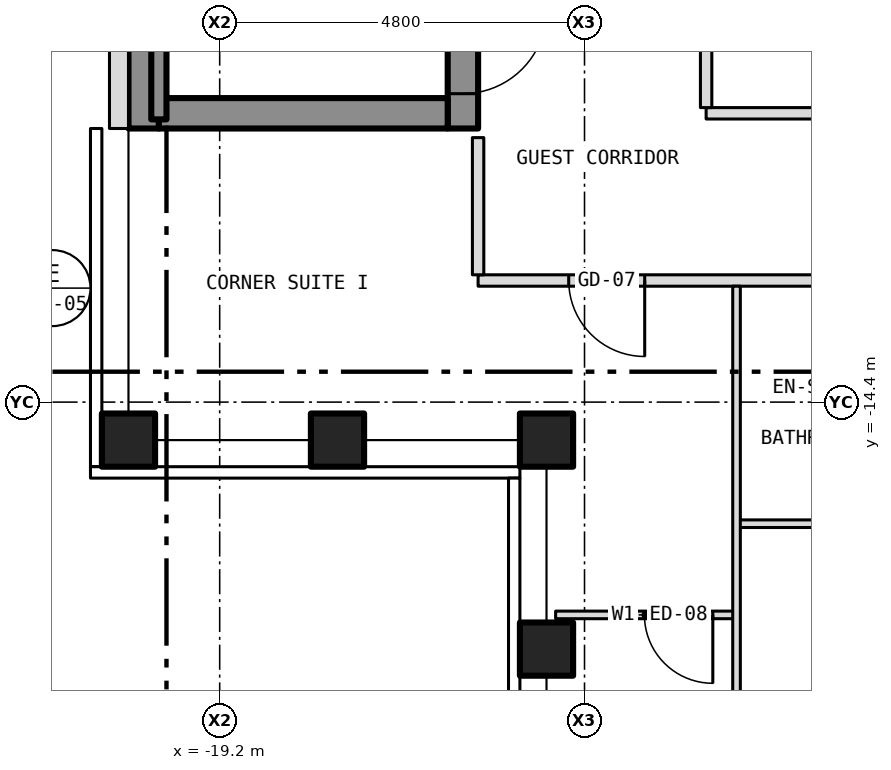
"""IFC4 building model, lengths in metres.
Left out: names, types, materials, properties, quantities, classifications, styles, units other than length and angle.
Written with IfcOpenShell. Run it as: python <this file> out.ifc"""

import sys

from ifc_helpers import new_model, si_unit, direction, frame, frame_2d, origin, origin_2d, place, context, subcontext, project, spatial, rectangle, hollow_rectangle, extrude, element, fill, save


model = new_model("IFC4")
c1 = context("Model", 3, precision=1e-05, world=origin(), true_north=direction((0.0, 1.0)))
c2 = subcontext(c1, "Body", "Model", "MODEL_VIEW")
j1 = project(units=[si_unit("LENGTHUNIT", "METRE"), si_unit("PLANEANGLEUNIT", "RADIAN")], contexts=[c1])
p1 = place(None, origin())
s1 = spatial("IfcSite", under=j1, at=p1, CompositionType="ELEMENT")
p2 = place(p1, origin())
s2 = spatial("IfcBuilding", under=s1, at=p2, CompositionType="ELEMENT")
p3 = place(p2, frame((0.0, 0.0, 212.0)))
s3 = spatial("IfcBuildingStorey", under=s2, at=p3, CompositionType="ELEMENT", Elevation=212.0)
for number, where, z_axis, x_axis in (
    (1, (-20.4, -14.9, -0.15), (0.0, 0.0, 1.0), (1.0, 0.0, 0.0)),
    (2, (-14.9, -14.9, -0.15), (0.0, 0.0, 1.0), (1.0, 0.0, 0.0)),
    (3, (-14.9, -17.65, -0.15), (0.0, 0.0, 1.0), (1.0, 0.0, 0.0)),
    (4, (-17.65, -14.9, -0.15), (0.0, 0.0, 1.0), (1.0, 0.0, 0.0)),
):
    element("IfcColumn", number, at=place(p3, frame(where, z_axis=z_axis, x_axis=x_axis)), inside=s3, PredefinedType="COLUMN", context=c2, shape_type="SweptSolid", body=[
        extrude(hollow_rectangle(XDim=0.7, YDim=0.7, WallThickness=0.04, at=origin_2d()), origin(), (0.0, 0.0, 1.0), 3.5),
    ])
p4 = place(p3, frame((-16.0, -10.8, 0.0), z_axis=(0.0, 0.0, 1.0), x_axis=(0.0, 1.0, 0.0)))
e5 = element("IfcWall", 5, at=p4, inside=s3, PredefinedType="SHEAR", context=c2, shape_type="SweptSolid", body=[
    extrude(rectangle(XDim=21.6, YDim=0.4, at=frame_2d((10.8, 0.0))), origin(), (0.0, 0.0, 1.0), 3.25),
])
p5 = place(p4, frame((9.4, 0.0, 0.0)))
e6 = element("IfcOpeningElement", 6, at=p5, cuts=e5, PredefinedType="OPENING", context=c2, shape_type="SweptSolid", body=[
    extrude(rectangle(XDim=1.1, YDim=2.1, at=frame_2d((0.55, 1.05))), frame((0.0, 0.212, 0.0), z_axis=(0.0, -1.0, 0.0), x_axis=(1.0, 0.0, 0.0)), (0.0, 0.0, 1.0), 0.424),
])
p6 = place(p4, frame((11.5, 0.0, 0.0)))
e7 = element("IfcOpeningElement", 7, at=p6, cuts=e5, PredefinedType="OPENING", context=c2, shape_type="SweptSolid", body=[
    extrude(rectangle(XDim=1.1, YDim=2.1, at=frame_2d((0.55, 1.05))), frame((0.0, 0.212, 0.0), z_axis=(0.0, -1.0, 0.0), x_axis=(1.0, 0.0, 0.0)), (0.0, 0.0, 1.0), 0.424),
])
p7 = place(p4, frame((13.6, 0.0, 0.0)))
e8 = element("IfcOpeningElement", 8, at=p7, cuts=e5, PredefinedType="OPENING", context=c2, shape_type="SweptSolid", body=[
    extrude(rectangle(XDim=1.1, YDim=2.1, at=frame_2d((0.55, 1.05))), frame((0.0, 0.212, 0.0), z_axis=(0.0, -1.0, 0.0), x_axis=(1.0, 0.0, 0.0)), (0.0, 0.0, 1.0), 0.424),
])
p8 = place(p4, frame((15.7, 0.0, 0.0)))
e9 = element("IfcOpeningElement", 9, at=p8, cuts=e5, PredefinedType="OPENING", context=c2, shape_type="SweptSolid", body=[
    extrude(rectangle(XDim=1.1, YDim=2.1, at=frame_2d((0.55, 1.05))), frame((0.0, 0.212, 0.0), z_axis=(0.0, -1.0, 0.0), x_axis=(1.0, 0.0, 0.0)), (0.0, 0.0, 1.0), 0.424),
])
p9 = place(p4, frame((17.8, 0.0, 0.0)))
e10 = element("IfcOpeningElement", 10, at=p9, cuts=e5, PredefinedType="OPENING", context=c2, shape_type="SweptSolid", body=[
    extrude(rectangle(XDim=1.1, YDim=2.1, at=frame_2d((0.55, 1.05))), frame((0.0, 0.212, 0.0), z_axis=(0.0, -1.0, 0.0), x_axis=(1.0, 0.0, 0.0)), (0.0, 0.0, 1.0), 0.424),
])
p10 = place(p4, frame((0.458, 0.0, 0.0)))
e11 = element("IfcOpeningElement", 11, at=p10, cuts=e5, PredefinedType="OPENING", context=c2, shape_type="SweptSolid", body=[
    extrude(rectangle(XDim=1.1, YDim=2.1, at=frame_2d((0.55, 1.05))), frame((0.0, 0.212, 0.0), z_axis=(0.0, -1.0, 0.0), x_axis=(1.0, 0.0, 0.0)), (0.0, 0.0, 1.0), 0.424),
])
p11 = place(p4, frame((7.5, 0.0, 0.0)))
e12 = element("IfcOpeningElement", 12, at=p11, cuts=e5, PredefinedType="OPENING", context=c2, shape_type="SweptSolid", body=[
    extrude(rectangle(XDim=1.1, YDim=2.1, at=frame_2d((0.55, 1.05))), frame((0.0, 0.212, 0.0), z_axis=(0.0, -1.0, 0.0), x_axis=(1.0, 0.0, 0.0)), (0.0, 0.0, 1.0), 0.424),
])
p12 = place(p4, frame((20.0, 0.0, 0.0)))
e13 = element("IfcOpeningElement", 13, at=p12, cuts=e5, PredefinedType="OPENING", context=c2, shape_type="SweptSolid", body=[
    extrude(rectangle(XDim=0.9, YDim=2.1, at=frame_2d((0.45, 1.05))), frame((0.0, 0.212, 0.0), z_axis=(0.0, -1.0, 0.0), x_axis=(1.0, 0.0, 0.0)), (0.0, 0.0, 1.0), 0.424),
])
p13 = place(p3, frame((-20.2, -10.8, 0.0), z_axis=(0.0, 0.0, 1.0), x_axis=(0.0, 1.0, 0.0)))
e14 = element("IfcWall", 14, at=p13, inside=s3, PredefinedType="SHEAR", context=c2, shape_type="SweptSolid", body=[
    extrude(rectangle(XDim=21.6, YDim=0.4, at=frame_2d((10.8, 0.0))), origin(), (0.0, 0.0, 1.0), 3.25),
])
p14 = place(p3, frame((-20.0, -10.6, 0.0), z_axis=(0.0, 0.0, 1.0), x_axis=(1.0, 0.0, 0.0)))
e15 = element("IfcWall", 15, at=p14, inside=s3, PredefinedType="SHEAR", context=c2, shape_type="SweptSolid", body=[
    extrude(rectangle(XDim=3.8, YDim=0.4, at=frame_2d((1.9, 0.0))), origin(), (0.0, 0.0, 1.0), 3.25),
])
p15 = place(p3, frame((-20.525, 10.8, 0.0), z_axis=(0.0, 0.0, 1.0), x_axis=(0.0, -1.0, 0.0)))
e16 = element("IfcWall", 16, at=p15, inside=s3, PredefinedType="SOLIDWALL", context=c2, shape_type="SweptSolid", body=[
    extrude(rectangle(XDim=21.6, YDim=0.25, at=frame_2d((10.8, 0.0))), origin(), (0.0, 0.0, 1.0), 3.5),
])
p16 = place(p15, frame((18.05, 0.0, 1.0)))
e17 = element("IfcOpeningElement", 17, at=p16, cuts=e16, PredefinedType="OPENING", context=c2, shape_type="SweptSolid", body=[
    extrude(rectangle(XDim=0.6, YDim=1.5, at=frame_2d((0.3, 0.75))), frame((0.0, 0.137, 0.0), z_axis=(0.0, -1.0, 0.0), x_axis=(1.0, 0.0, 0.0)), (0.0, 0.0, 1.0), 0.274),
])
p17 = place(p3, frame((-14.78, -17.2, 0.0), z_axis=(0.0, 0.0, 1.0), x_axis=(1.0, 0.0, 0.0)))
e18 = element("IfcWall", 18, at=p17, inside=s3, PredefinedType="PARTITIONING", context=c2, shape_type="SweptSolid", body=[
    extrude(rectangle(XDim=2.38, YDim=0.1, at=frame_2d((1.19, 0.0))), origin(), (0.0, 0.0, 1.0), 3.35),
])
p18 = place(p17, frame((1.168, 0.0, 0.0)))
e19 = element("IfcOpeningElement", 19, at=p18, cuts=e18, PredefinedType="OPENING", context=c2, shape_type="SweptSolid", body=[
    extrude(rectangle(XDim=0.9, YDim=2.1, at=frame_2d((0.45, 1.05))), frame((0.0, 0.062, 0.0), z_axis=(0.0, -1.0, 0.0), x_axis=(1.0, 0.0, 0.0)), (0.0, 0.0, 1.0), 0.124),
])
p19 = place(p3, frame((-12.4, -16.0, 0.0), z_axis=(0.0, 0.0, 1.0), x_axis=(1.0, 0.0, 0.0)))
e20 = element("IfcWall", 20, at=p19, inside=s3, PredefinedType="PARTITIONING", context=c2, shape_type="SweptSolid", body=[
    extrude(rectangle(XDim=2.2, YDim=0.1, at=frame_2d((1.1, 0.0))), origin(), (0.0, 0.0, 1.0), 3.35),
])
p20 = place(p3, frame((-15.8, -12.8, 0.0), z_axis=(0.0, 0.0, 1.0), x_axis=(1.0, 0.0, 0.0)))
e21 = element("IfcWall", 21, at=p20, inside=s3, PredefinedType="PARTITIONING", context=c2, shape_type="SweptSolid", body=[
    extrude(rectangle(XDim=31.6, YDim=0.15, at=frame_2d((15.8, 0.0))), origin(), (0.0, 0.0, 1.0), 3.35),
])
p21 = place(p20, frame((6.466, 0.0, 0.0)))
e22 = element("IfcOpeningElement", 22, at=p21, cuts=e21, PredefinedType="OPENING", context=c2, shape_type="SweptSolid", body=[
    extrude(rectangle(XDim=1.0, YDim=2.1, at=frame_2d((0.5, 1.05))), frame((0.0, 0.087, 0.0), z_axis=(0.0, -1.0, 0.0), x_axis=(1.0, 0.0, 0.0)), (0.0, 0.0, 1.0), 0.174),
])
p22 = place(p20, frame((15.548, 0.0, 0.0)))
e23 = element("IfcOpeningElement", 23, at=p22, cuts=e21, PredefinedType="OPENING", context=c2, shape_type="SweptSolid", body=[
    extrude(rectangle(XDim=1.0, YDim=2.1, at=frame_2d((0.5, 1.05))), frame((0.0, 0.087, 0.0), z_axis=(0.0, -1.0, 0.0), x_axis=(1.0, 0.0, 0.0)), (0.0, 0.0, 1.0), 0.174),
])
p23 = place(p20, frame((20.018, 0.0, 0.0)))
e24 = element("IfcOpeningElement", 24, at=p23, cuts=e21, PredefinedType="OPENING", context=c2, shape_type="SweptSolid", body=[
    extrude(rectangle(XDim=1.0, YDim=2.1, at=frame_2d((0.5, 1.05))), frame((0.0, 0.087, 0.0), z_axis=(0.0, -1.0, 0.0), x_axis=(1.0, 0.0, 0.0)), (0.0, 0.0, 1.0), 0.174),
])
p24 = place(p20, frame((1.192, 0.0, 0.0)))
e25 = element("IfcOpeningElement", 25, at=p24, cuts=e21, PredefinedType="OPENING", context=c2, shape_type="SweptSolid", body=[
    extrude(rectangle(XDim=1.0, YDim=2.1, at=frame_2d((0.5, 1.05))), frame((0.0, 0.087, 0.0), z_axis=(0.0, -1.0, 0.0), x_axis=(1.0, 0.0, 0.0)), (0.0, 0.0, 1.0), 0.174),
])
p25 = place(p20, frame((29.409, 0.0, 0.0)))
e26 = element("IfcOpeningElement", 26, at=p25, cuts=e21, PredefinedType="OPENING", context=c2, shape_type="SweptSolid", body=[
    extrude(rectangle(XDim=1.0, YDim=2.1, at=frame_2d((0.5, 1.05))), frame((0.0, 0.087, 0.0), z_axis=(0.0, -1.0, 0.0), x_axis=(1.0, 0.0, 0.0)), (0.0, 0.0, 1.0), 0.174),
])
p26 = place(p3, frame((-12.8, -10.6, 0.0), z_axis=(0.0, 0.0, 1.0), x_axis=(1.0, 0.0, 0.0)))
e27 = element("IfcWall", 27, at=p26, inside=s3, PredefinedType="PARTITIONING", context=c2, shape_type="SweptSolid", body=[
    extrude(rectangle(XDim=13.9, YDim=0.15, at=frame_2d((6.95, 0.0))), origin(), (0.0, 0.0, 1.0), 3.35),
])
p27 = place(p3, frame((-20.0, -10.68, 0.0), z_axis=(0.0, 0.0, 1.0), x_axis=(0.0, 1.0, 0.0)))
e28 = element("IfcWall", 28, at=p27, inside=s3, PredefinedType="SHEAR", context=c2, shape_type="SweptSolid", body=[
    extrude(rectangle(XDim=6.98, YDim=0.2, at=frame_2d((3.49, 0.0))), origin(), (0.0, 0.0, 1.0), 3.25),
])
p28 = place(p3, frame((-15.8, -12.725, 0.0), z_axis=(0.0, 0.0, 1.0), x_axis=(0.0, 1.0, 0.0)))
e29 = element("IfcWall", 29, at=p28, inside=s3, PredefinedType="PARTITIONING", context=c2, shape_type="SweptSolid", body=[
    extrude(rectangle(XDim=1.805, YDim=0.15, at=frame_2d((0.903, 0.0))), origin(), (0.0, 0.0, 1.0), 3.35),
])
p29 = place(p3, frame((-12.8, -10.525, 0.0), z_axis=(0.0, 0.0, 1.0), x_axis=(0.0, 1.0, 0.0)))
e30 = element("IfcWall", 30, at=p29, inside=s3, PredefinedType="PARTITIONING", context=c2, shape_type="SweptSolid", body=[
    extrude(rectangle(XDim=8.525, YDim=0.15, at=frame_2d((4.262, 0.0))), origin(), (0.0, 0.0, 1.0), 3.35),
])
p30 = place(p29, frame((3.825, 0.0, 0.0)))
e31 = element("IfcOpeningElement", 31, at=p30, cuts=e30, PredefinedType="OPENING", context=c2, shape_type="SweptSolid", body=[
    extrude(rectangle(XDim=0.9, YDim=2.1, at=frame_2d((0.45, 1.05))), frame((0.0, 0.087, 0.0), z_axis=(0.0, -1.0, 0.0), x_axis=(1.0, 0.0, 0.0)), (0.0, 0.0, 1.0), 0.174),
])
p31 = place(p3, frame((-12.4, -20.78, 0.0), z_axis=(0.0, 0.0, 1.0), x_axis=(0.0, 1.0, 0.0)))
e32 = element("IfcWall", 32, at=p31, inside=s3, PredefinedType="PARTITIONING", context=c2, shape_type="SweptSolid", body=[
    extrude(rectangle(XDim=7.905, YDim=0.1, at=frame_2d((3.953, 0.0))), origin(), (0.0, 0.0, 1.0), 3.35),
])
p32 = place(p10, origin())
e33 = element("IfcDoor", 33, at=p32, inside=s3, OperationType="SINGLE_SWING_RIGHT", PredefinedType="DOOR", context=c2, shape_type="SweptSolid", body=[
    extrude(rectangle(XDim=1.1, YDim=2.1, at=frame_2d((0.55, 1.05))), frame((0.0, 0.025, 0.0), z_axis=(0.0, -1.0, 0.0), x_axis=(1.0, 0.0, 0.0)), (0.0, 0.0, 1.0), 0.05),
])
fill(e11, e33)
p33 = place(p18, origin())
e34 = element("IfcDoor", 34, at=p33, inside=s3, OperationType="SINGLE_SWING_RIGHT", PredefinedType="DOOR", context=c2, shape_type="SweptSolid", body=[
    extrude(rectangle(XDim=0.9, YDim=2.1, at=frame_2d((0.45, 1.05))), frame((0.0, 0.025, 0.0), z_axis=(0.0, -1.0, 0.0), x_axis=(1.0, 0.0, 0.0)), (0.0, 0.0, 1.0), 0.05),
])
fill(e19, e34)
p34 = place(p24, origin())
e35 = element("IfcDoor", 35, at=p34, inside=s3, OperationType="SINGLE_SWING_RIGHT", PredefinedType="DOOR", context=c2, shape_type="SweptSolid", body=[
    extrude(rectangle(XDim=1.0, YDim=2.1, at=frame_2d((0.5, 1.05))), frame((0.0, 0.025, 0.0), z_axis=(0.0, -1.0, 0.0), x_axis=(1.0, 0.0, 0.0)), (0.0, 0.0, 1.0), 0.05),
])
fill(e25, e35)
save(model, sys.argv[1])
